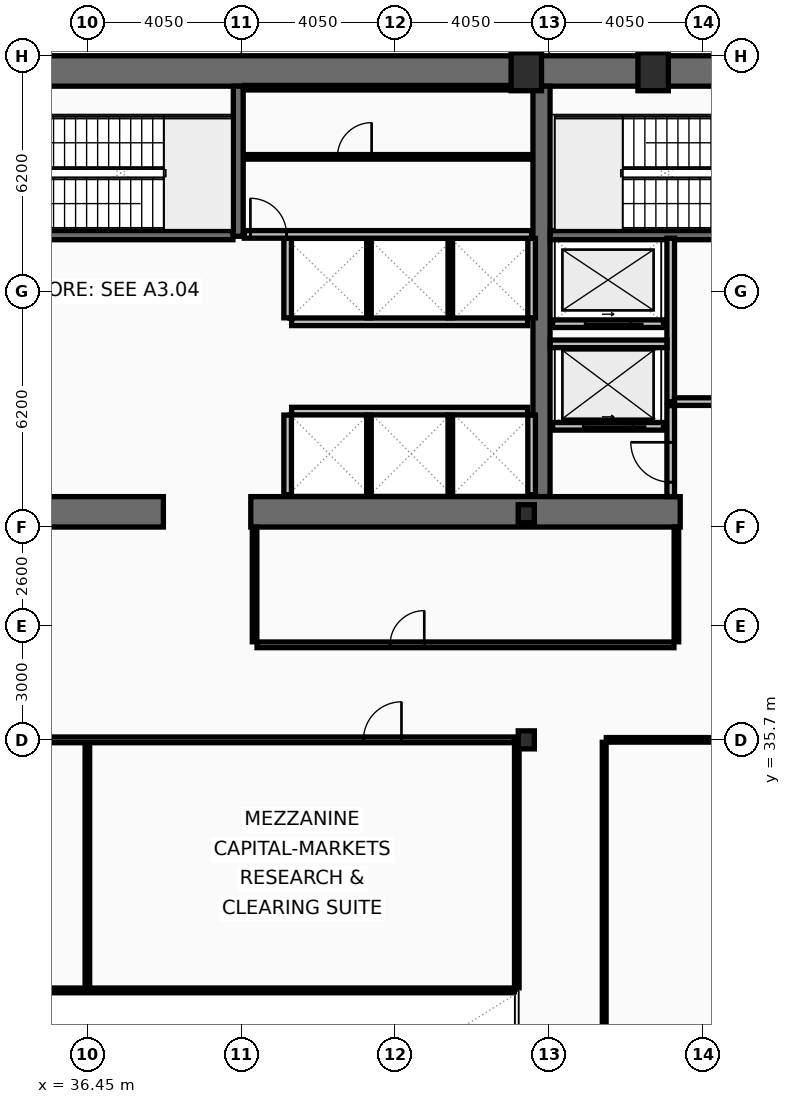
"""IFC4 building model, lengths in metres.
Left out: names, types, materials, properties, quantities, classifications, styles, units other than length and angle.
Written with IfcOpenShell. Run it as: python <this file> out.ifc"""

import sys

from ifc_helpers import new_model, si_unit, direction, frame, frame_2d, origin, origin_2d, place, context, subcontext, project, spatial, rectangle, hollow_rectangle, i_section, extrude, element, fill, save


model = new_model("IFC4")
c1 = context("Model", 3, precision=1e-05, world=origin(), true_north=direction((0.0, 1.0)))
c2 = subcontext(c1, "Body", "Model", "MODEL_VIEW")
j1 = project(units=[si_unit("LENGTHUNIT", "METRE"), si_unit("PLANEANGLEUNIT", "RADIAN")], contexts=[c1])
p1 = place(None, origin())
s1 = spatial("IfcSite", under=j1, at=p1, CompositionType="ELEMENT")
p2 = place(p1, origin())
s2 = spatial("IfcBuilding", under=s1, at=p2, CompositionType="ELEMENT")
p3 = place(p2, frame((0.0, 0.0, 5.4)))
s3 = spatial("IfcBuildingStorey", under=s2, at=p3, CompositionType="ELEMENT", Elevation=5.4)
p4 = place(p3, frame((16.2, 53.3, 0.0), z_axis=(0.0, 0.0, 1.0), x_axis=(1.0, 0.0, 0.0)))
e1 = element("IfcWall", 1, at=p4, inside=s3, PredefinedType="SHEAR", context=c2, shape_type="SweptSolid", body=[
    extrude(rectangle(XDim=40.5, YDim=0.8, at=frame_2d((20.25, 0.0))), origin(), (0.0, 0.0, 1.0), 4.8),
])
p5 = place(p3, frame((48.4, 42.1, 0.0), z_axis=(0.0, 0.0, 1.0), x_axis=(0.0, 1.0, 0.0)))
e2 = element("IfcWall", 2, at=p5, inside=s3, PredefinedType="SHEAR", context=c2, shape_type="SweptSolid", body=[
    extrude(rectangle(XDim=10.8, YDim=0.45, at=frame_2d((5.4, 0.0))), origin(), (0.0, 0.0, 1.0), 4.8),
])
p6 = place(p3, frame((38.45, 41.7, 0.0), z_axis=(0.0, 0.0, 1.0), x_axis=(-1.0, 0.0, 0.0)))
e3 = element("IfcWall", 3, at=p6, inside=s3, PredefinedType="SHEAR", context=c2, shape_type="SweptSolid", body=[
    extrude(rectangle(XDim=3.75, YDim=0.8, at=frame_2d((1.875, 0.0))), origin(), (0.0, 0.0, 1.0), 4.8),
])
p7 = place(p3, frame((52.05, 41.7, 0.0), z_axis=(0.0, 0.0, 1.0), x_axis=(-1.0, 0.0, 0.0)))
e4 = element("IfcWall", 4, at=p7, inside=s3, PredefinedType="SHEAR", context=c2, shape_type="SweptSolid", body=[
    extrude(rectangle(XDim=11.3, YDim=0.8, at=frame_2d((5.65, 0.0))), origin(), (0.0, 0.0, 1.0), 4.8),
])
p8 = place(p3, frame((40.42, 48.95, 0.0), z_axis=(0.0, 0.0, 1.0), x_axis=(0.0, 1.0, 0.0)))
e5 = element("IfcWall", 5, at=p8, inside=s3, PredefinedType="SHEAR", context=c2, shape_type="SweptSolid", body=[
    extrude(rectangle(XDim=3.95, YDim=0.26, at=frame_2d((1.975, 0.0))), origin(), (0.0, 0.0, 1.0), 4.8),
])
p9 = place(p3, frame((48.63, 48.98, 0.0), z_axis=(0.0, 0.0, 1.0), x_axis=(1.0, 0.0, 0.0)))
e6 = element("IfcWall", 6, at=p9, inside=s3, PredefinedType="SHEAR", context=c2, shape_type="SweptSolid", body=[
    extrude(rectangle(XDim=7.27, YDim=0.24, at=frame_2d((3.635, 0.0))), origin(), (0.0, 0.0, 1.0), 4.8),
])
p10 = place(p9, frame((6.0, 0.0, 0.0)))
e7 = element("IfcOpeningElement", 7, at=p10, cuts=e6, PredefinedType="OPENING", context=c2, shape_type="SweptSolid", body=[
    extrude(rectangle(XDim=1.05, YDim=2.15, at=frame_2d((0.525, 1.075))), frame((0.0, 0.13, 0.0), z_axis=(0.0, -1.0, 0.0), x_axis=(1.0, 0.0, 0.0)), (0.0, 0.0, 1.0), 0.26),
])
p11 = place(p3, frame((32.72, 48.98, 0.0), z_axis=(0.0, 0.0, 1.0), x_axis=(1.0, 0.0, 0.0)))
e8 = element("IfcWall", 8, at=p11, inside=s3, PredefinedType="SHEAR", context=c2, shape_type="SweptSolid", body=[
    extrude(rectangle(XDim=7.56, YDim=0.24, at=frame_2d((3.78, 0.0))), origin(), (0.0, 0.0, 1.0), 4.8),
])
p12 = place(p11, frame((0.22, 0.0, 0.0)))
e9 = element("IfcOpeningElement", 9, at=p12, cuts=e8, PredefinedType="OPENING", context=c2, shape_type="SweptSolid", body=[
    extrude(rectangle(XDim=1.05, YDim=2.15, at=frame_2d((0.525, 1.075))), frame((0.0, 0.13, 0.0), z_axis=(0.0, -1.0, 0.0), x_axis=(1.0, 0.0, 0.0)), (0.0, 0.0, 1.0), 0.26),
])
for number, where, z_axis, x_axis in (
    (10, (48.0, 53.28, 0.0), (0.0, 0.0, 1.0), (1.0, 0.0, 0.0)),
    (11, (51.337, 53.28, 0.0), (0.0, 0.0, 1.0), (1.0, 0.0, 0.0)),
):
    element("IfcColumn", number, at=place(p3, frame(where, z_axis=z_axis, x_axis=x_axis)), inside=s3, PredefinedType="COLUMN", context=c2, shape_type="SweptSolid", body=[
        extrude(hollow_rectangle(XDim=0.8, YDim=1.0, WallThickness=0.055, at=origin_2d()), origin(), (0.0, 0.0, 1.0), 5.0),
    ])
for number, where, z_axis, x_axis in (
    (12, (48.0, 35.7, 0.0), (0.0, 0.0, 1.0), (1.0, 0.0, 0.0)),
    (13, (48.0, 41.65, 0.0), (0.0, 0.0, 1.0), (1.0, 0.0, 0.0)),
):
    element("IfcColumn", number, at=place(p3, frame(where, z_axis=z_axis, x_axis=x_axis)), inside=s3, PredefinedType="COLUMN", context=c2, shape_type="SweptSolid", body=[
        extrude(i_section(OverallWidth=0.424, OverallDepth=0.474, WebThickness=0.048, FlangeThickness=0.077, at=origin_2d()), origin(), (0.0, 0.0, 1.0), 5.0),
    ])
p13 = place(p3, frame((51.61, 43.95, 0.0), z_axis=(0.0, 0.0, 1.0), x_axis=(-1.0, 0.0, 0.0)))
e14 = element("IfcWall", 14, at=p13, inside=s3, PredefinedType="PARTITIONING", context=c2, shape_type="SweptSolid", body=[
    extrude(rectangle(XDim=2.92, YDim=0.2, at=frame_2d((1.46, 0.0))), origin(), (0.0, 0.0, 1.0), 4.8),
])
p14 = place(p13, frame((0.81, 0.0, 0.0)))
e15 = element("IfcOpeningElement", 15, at=p14, cuts=e14, PredefinedType="OPENING", context=c2, shape_type="SweptSolid", body=[
    extrude(rectangle(XDim=1.3, YDim=2.18, at=frame_2d((0.65, 1.09))), frame((0.0, 0.11, 0.0), z_axis=(0.0, -1.0, 0.0), x_axis=(1.0, 0.0, 0.0)), (0.0, 0.0, 1.0), 0.22),
])
p15 = place(p3, frame((51.61, 46.65, 0.0), z_axis=(0.0, 0.0, 1.0), x_axis=(-1.0, 0.0, 0.0)))
e16 = element("IfcWall", 16, at=p15, inside=s3, PredefinedType="PARTITIONING", context=c2, shape_type="SweptSolid", body=[
    extrude(rectangle(XDim=2.92, YDim=0.2, at=frame_2d((1.46, 0.0))), origin(), (0.0, 0.0, 1.0), 4.8),
])
p16 = place(p15, frame((0.86, 0.0, 0.0)))
e17 = element("IfcOpeningElement", 17, at=p16, cuts=e16, PredefinedType="OPENING", context=c2, shape_type="SweptSolid", body=[
    extrude(rectangle(XDim=1.2, YDim=2.18, at=frame_2d((0.6, 1.09))), frame((0.0, 0.11, 0.0), z_axis=(0.0, -1.0, 0.0), x_axis=(1.0, 0.0, 0.0)), (0.0, 0.0, 1.0), 0.22),
])
p17 = place(p3, frame((51.8, 44.6, 0.0), z_axis=(0.0, 0.0, 1.0), x_axis=(0.0, 1.0, 0.0)))
e18 = element("IfcWall", 18, at=p17, inside=s3, PredefinedType="PARTITIONING", context=c2, shape_type="SweptSolid", body=[
    extrude(rectangle(XDim=4.3, YDim=0.2, at=frame_2d((2.15, 0.0))), origin(), (0.0, 0.0, 1.0), 4.8),
])
p18 = place(p3, frame((51.9, 44.6, 0.0), z_axis=(0.0, 0.0, 1.0), x_axis=(1.0, 0.0, 0.0)))
e19 = element("IfcWall", 19, at=p18, inside=s3, PredefinedType="PARTITIONING", context=c2, shape_type="SweptSolid", body=[
    extrude(rectangle(XDim=4.0, YDim=0.2, at=frame_2d((2.0, 0.0))), origin(), (0.0, 0.0, 1.0), 4.8),
])
p19 = place(p18, frame((1.15, 0.0, 0.0)))
e20 = element("IfcOpeningElement", 20, at=p19, cuts=e19, PredefinedType="OPENING", context=c2, shape_type="SweptSolid", body=[
    extrude(rectangle(XDim=1.05, YDim=2.15, at=frame_2d((0.525, 1.075))), frame((0.0, 0.11, 0.0), z_axis=(0.0, -1.0, 0.0), x_axis=(1.0, 0.0, 0.0)), (0.0, 0.0, 1.0), 0.22),
])
p20 = place(p3, frame((48.63, 46.12, 0.0), z_axis=(0.0, 0.0, 1.0), x_axis=(1.0, 0.0, 0.0)))
e21 = element("IfcWall", 21, at=p20, inside=s3, PredefinedType="PARTITIONING", context=c2, shape_type="SweptSolid", body=[
    extrude(rectangle(XDim=3.07, YDim=0.2, at=frame_2d((1.535, 0.0))), origin(), (0.0, 0.0, 1.0), 4.8),
])
p21 = place(p3, frame((51.8, 42.1, 0.0), z_axis=(0.0, 0.0, 1.0), x_axis=(0.0, 1.0, 0.0)))
e22 = element("IfcWall", 22, at=p21, inside=s3, PredefinedType="PARTITIONING", context=c2, shape_type="SweptSolid", body=[
    extrude(rectangle(XDim=2.395, YDim=0.2, at=frame_2d((1.198, 0.0))), origin(), (0.0, 0.0, 1.0), 4.8),
])
p22 = place(p21, frame((0.38, 0.0, 0.0)))
e23 = element("IfcOpeningElement", 23, at=p22, cuts=e22, PredefinedType="OPENING", context=c2, shape_type="SweptSolid", body=[
    extrude(rectangle(XDim=1.05, YDim=2.15, at=frame_2d((0.525, 1.075))), frame((0.0, 0.11, 0.0), z_axis=(0.0, -1.0, 0.0), x_axis=(1.0, 0.0, 0.0)), (0.0, 0.0, 1.0), 0.22),
])
p23 = place(p3, frame((41.825, 46.7, 0.0), z_axis=(0.0, 0.0, 1.0), x_axis=(1.0, 0.0, 0.0)))
e24 = element("IfcWall", 24, at=p23, inside=s3, PredefinedType="PARTITIONING", context=c2, shape_type="SweptSolid", body=[
    extrude(rectangle(XDim=6.21, YDim=0.2, at=frame_2d((3.105, 0.0))), origin(), (0.0, 0.0, 1.0), 4.8),
])
for number, where, z_axis, x_axis in (
    (25, (41.72, 46.805, 0.0), (0.0, 0.0, 1.0), (0.0, 1.0, 0.0)),
    (26, (48.14, 46.805, 0.0), (0.0, 0.0, 1.0), (0.0, 1.0, 0.0)),
):
    element("IfcWall", number, at=place(p3, frame(where, z_axis=z_axis, x_axis=x_axis)), inside=s3, PredefinedType="PARTITIONING", context=c2, shape_type="SweptSolid", body=[
        extrude(rectangle(XDim=2.09, YDim=0.2, at=frame_2d((1.045, 0.0))), origin(), (0.0, 0.0, 1.0), 4.8),
    ])
for number, where, z_axis, x_axis in (
    (27, (43.86, 46.805, 0.0), (0.0, 0.0, 1.0), (0.0, 1.0, 0.0)),
    (28, (46.0, 46.805, 0.0), (0.0, 0.0, 1.0), (0.0, 1.0, 0.0)),
):
    element("IfcWall", number, at=place(p3, frame(where, z_axis=z_axis, x_axis=x_axis)), inside=s3, PredefinedType="PARTITIONING", context=c2, shape_type="SweptSolid", body=[
        extrude(rectangle(XDim=2.09, YDim=0.12, at=frame_2d((1.045, 0.0))), origin(), (0.0, 0.0, 1.0), 4.8),
    ])
p24 = place(p3, frame((41.825, 44.35, 0.0), z_axis=(0.0, 0.0, 1.0), x_axis=(1.0, 0.0, 0.0)))
e29 = element("IfcWall", 29, at=p24, inside=s3, PredefinedType="PARTITIONING", context=c2, shape_type="SweptSolid", body=[
    extrude(rectangle(XDim=6.21, YDim=0.2, at=frame_2d((3.105, 0.0))), origin(), (0.0, 0.0, 1.0), 4.8),
])
for number, where, z_axis, x_axis in (
    (30, (41.72, 42.15, 0.0), (0.0, 0.0, 1.0), (0.0, 1.0, 0.0)),
    (31, (48.14, 42.15, 0.0), (0.0, 0.0, 1.0), (0.0, 1.0, 0.0)),
):
    element("IfcWall", number, at=place(p3, frame(where, z_axis=z_axis, x_axis=x_axis)), inside=s3, PredefinedType="PARTITIONING", context=c2, shape_type="SweptSolid", body=[
        extrude(rectangle(XDim=2.095, YDim=0.2, at=frame_2d((1.048, 0.0))), origin(), (0.0, 0.0, 1.0), 4.8),
    ])
for number, where, z_axis, x_axis in (
    (32, (43.86, 42.15, 0.0), (0.0, 0.0, 1.0), (0.0, 1.0, 0.0)),
    (33, (46.0, 42.15, 0.0), (0.0, 0.0, 1.0), (0.0, 1.0, 0.0)),
):
    element("IfcWall", number, at=place(p3, frame(where, z_axis=z_axis, x_axis=x_axis)), inside=s3, PredefinedType="PARTITIONING", context=c2, shape_type="SweptSolid", body=[
        extrude(rectangle(XDim=2.095, YDim=0.12, at=frame_2d((1.048, 0.0))), origin(), (0.0, 0.0, 1.0), 4.8),
    ])
p25 = place(p3, frame((40.58, 52.86, 0.0), z_axis=(0.0, 0.0, 1.0), x_axis=(1.0, 0.0, 0.0)))
e34 = element("IfcWall", 34, at=p25, inside=s3, PredefinedType="PARTITIONING", context=c2, shape_type="SweptSolid", body=[
    extrude(rectangle(XDim=7.56, YDim=0.12, at=frame_2d((3.78, 0.0))), origin(), (0.0, 0.0, 1.0), 4.8),
])
p26 = place(p3, frame((40.58, 49.0, 0.0), z_axis=(0.0, 0.0, 1.0), x_axis=(1.0, 0.0, 0.0)))
e35 = element("IfcWall", 35, at=p26, inside=s3, PredefinedType="PARTITIONING", context=c2, shape_type="SweptSolid", body=[
    extrude(rectangle(XDim=7.56, YDim=0.2, at=frame_2d((3.78, 0.0))), origin(), (0.0, 0.0, 1.0), 4.8),
])
p27 = place(p26, frame((0.16, 0.0, 0.0)))
e36 = element("IfcOpeningElement", 36, at=p27, cuts=e35, PredefinedType="OPENING", context=c2, shape_type="SweptSolid", body=[
    extrude(rectangle(XDim=0.95, YDim=2.1, at=frame_2d((0.475, 1.05))), frame((0.0, 0.11, 0.0), z_axis=(0.0, -1.0, 0.0), x_axis=(1.0, 0.0, 0.0)), (0.0, 0.0, 1.0), 0.22),
])
p28 = place(p3, frame((40.63, 51.04, 0.0), z_axis=(0.0, 0.0, 1.0), x_axis=(1.0, 0.0, 0.0)))
e37 = element("IfcWall", 37, at=p28, inside=s3, PredefinedType="PARTITIONING", context=c2, shape_type="SweptSolid", body=[
    extrude(rectangle(XDim=7.46, YDim=0.12, at=frame_2d((3.73, 0.0))), origin(), (0.0, 0.0, 1.0), 4.8),
])
p29 = place(p28, frame((2.4, 0.0, 0.0)))
e38 = element("IfcOpeningElement", 38, at=p29, cuts=e37, PredefinedType="OPENING", context=c2, shape_type="SweptSolid", body=[
    extrude(rectangle(XDim=0.9, YDim=2.05, at=frame_2d((0.45, 1.025))), frame((0.0, 0.07, 0.0), z_axis=(0.0, -1.0, 0.0), x_axis=(1.0, 0.0, 0.0)), (0.0, 0.0, 1.0), 0.14),
])
p30 = place(p3, frame((25.215, 29.12, 0.0), z_axis=(0.0, 0.0, 1.0), x_axis=(1.0, 0.0, 0.0)))
e39 = element("IfcWall", 39, at=p30, inside=s3, PredefinedType="MOVABLE", context=c2, shape_type="SweptSolid", body=[
    extrude(rectangle(XDim=22.47, YDim=0.1, at=frame_2d((11.235, 0.0))), origin(), (0.0, 0.0, 1.0), 3.89),
])
p31 = place(p3, frame((36.45, 29.175, 0.0), z_axis=(0.0, 0.0, 1.0), x_axis=(0.0, 1.0, 0.0)))
e40 = element("IfcWall", 40, at=p31, inside=s3, PredefinedType="PARTITIONING", context=c2, shape_type="SweptSolid", body=[
    extrude(rectangle(XDim=6.445, YDim=0.12, at=frame_2d((3.223, 0.0))), origin(), (0.0, 0.0, 1.0), 3.89),
])
p32 = place(p3, frame((25.215, 35.7, 0.0), z_axis=(0.0, 0.0, 1.0), x_axis=(1.0, 0.0, 0.0)))
e41 = element("IfcWall", 41, at=p32, inside=s3, PredefinedType="PARTITIONING", context=c2, shape_type="SweptSolid", body=[
    extrude(rectangle(XDim=22.47, YDim=0.15, at=frame_2d((11.235, 0.0))), origin(), (0.0, 0.0, 1.0), 3.89),
])
p33 = place(p32, frame((6.0, 0.0, 0.0)))
e42 = element("IfcOpeningElement", 42, at=p33, cuts=e41, PredefinedType="OPENING", context=c2, shape_type="SweptSolid", body=[
    extrude(rectangle(XDim=1.0, YDim=2.05, at=frame_2d((0.5, 1.025))), frame((0.0, 0.085, 0.0), z_axis=(0.0, -1.0, 0.0), x_axis=(1.0, 0.0, 0.0)), (0.0, 0.0, 1.0), 0.17),
])
p34 = place(p32, frame((18.5, 0.0, 0.0)))
e43 = element("IfcOpeningElement", 43, at=p34, cuts=e41, PredefinedType="OPENING", context=c2, shape_type="SweptSolid", body=[
    extrude(rectangle(XDim=1.0, YDim=2.05, at=frame_2d((0.5, 1.025))), frame((0.0, 0.085, 0.0), z_axis=(0.0, -1.0, 0.0), x_axis=(1.0, 0.0, 0.0)), (0.0, 0.0, 1.0), 0.17),
])
p35 = place(p3, frame((47.75, 29.175, 0.0), z_axis=(0.0, 0.0, 1.0), x_axis=(0.0, 1.0, 0.0)))
e44 = element("IfcWall", 44, at=p35, inside=s3, PredefinedType="PARTITIONING", context=c2, shape_type="SweptSolid", body=[
    extrude(rectangle(XDim=6.445, YDim=0.12, at=frame_2d((3.223, 0.0))), origin(), (0.0, 0.0, 1.0), 3.89),
])
for number, where, z_axis, x_axis in (
    (45, (40.85, 38.28, 0.0), (0.0, 0.0, 1.0), (0.0, 1.0, 0.0)),
    (46, (51.95, 38.28, 0.0), (0.0, 0.0, 1.0), (0.0, 1.0, 0.0)),
):
    element("IfcWall", number, at=place(p3, frame(where, z_axis=z_axis, x_axis=x_axis)), inside=s3, PredefinedType="PARTITIONING", context=c2, shape_type="SweptSolid", body=[
        extrude(rectangle(XDim=3.02, YDim=0.12, at=frame_2d((1.51, 0.0))), origin(), (0.0, 0.0, 1.0), 4.8),
    ])
p36 = place(p3, frame((40.915, 38.2, 0.0), z_axis=(0.0, 0.0, 1.0), x_axis=(1.0, 0.0, 0.0)))
e47 = element("IfcWall", 47, at=p36, inside=s3, PredefinedType="PARTITIONING", context=c2, shape_type="SweptSolid", body=[
    extrude(rectangle(XDim=10.97, YDim=0.15, at=frame_2d((5.485, 0.0))), origin(), (0.0, 0.0, 1.0), 3.89),
])
p37 = place(p36, frame((3.5, 0.0, 0.0)))
e48 = element("IfcOpeningElement", 48, at=p37, cuts=e47, PredefinedType="OPENING", context=c2, shape_type="SweptSolid", body=[
    extrude(rectangle(XDim=0.9, YDim=2.05, at=frame_2d((0.45, 1.025))), frame((0.0, 0.085, 0.0), z_axis=(0.0, -1.0, 0.0), x_axis=(1.0, 0.0, 0.0)), (0.0, 0.0, 1.0), 0.17),
])
p38 = place(p3, frame((50.05, 14.965, 0.0), z_axis=(0.0, 0.0, 1.0), x_axis=(0.0, 1.0, 0.0)))
e49 = element("IfcWall", 49, at=p38, inside=s3, PredefinedType="MOVABLE", context=c2, shape_type="SweptSolid", body=[
    extrude(rectangle(XDim=20.67, YDim=0.1, at=frame_2d((10.335, 0.0))), origin(), (0.0, 0.0, 1.0), 4.19),
])
p39 = place(p38, frame((6.5, 0.0, 0.0)))
e50 = element("IfcOpeningElement", 50, at=p39, cuts=e49, PredefinedType="OPENING", context=c2, shape_type="SweptSolid", body=[
    extrude(rectangle(XDim=1.0, YDim=2.05, at=frame_2d((0.5, 1.025))), frame((0.0, 0.06, 0.0), z_axis=(0.0, -1.0, 0.0), x_axis=(1.0, 0.0, 0.0)), (0.0, 0.0, 1.0), 0.12),
])
p40 = place(p3, frame((50.105, 35.7, 0.0), z_axis=(0.0, 0.0, 1.0), x_axis=(1.0, 0.0, 0.0)))
e51 = element("IfcWall", 51, at=p40, inside=s3, PredefinedType="PARTITIONING", context=c2, shape_type="SweptSolid", body=[
    extrude(rectangle(XDim=6.555, YDim=0.12, at=frame_2d((3.277, 0.0))), origin(), (0.0, 0.0, 1.0), 3.89),
])
p41 = place(p14, origin())
e52 = element("IfcDoor", 52, at=p41, inside=s3, OperationType="SLIDING_TO_LEFT", PredefinedType="DOOR", context=c2, shape_type="SweptSolid", body=[
    extrude(rectangle(XDim=1.3, YDim=2.18, at=frame_2d((0.65, 1.09))), frame((0.0, 0.025, 0.0), z_axis=(0.0, -1.0, 0.0), x_axis=(1.0, 0.0, 0.0)), (0.0, 0.0, 1.0), 0.05),
])
fill(e15, e52)
p42 = place(p16, origin())
e53 = element("IfcDoor", 53, at=p42, inside=s3, OperationType="SLIDING_TO_LEFT", PredefinedType="DOOR", context=c2, shape_type="SweptSolid", body=[
    extrude(rectangle(XDim=1.2, YDim=2.18, at=frame_2d((0.6, 1.09))), frame((0.0, 0.025, 0.0), z_axis=(0.0, -1.0, 0.0), x_axis=(1.0, 0.0, 0.0)), (0.0, 0.0, 1.0), 0.05),
])
fill(e17, e53)
p43 = place(p22, origin())
e54 = element("IfcDoor", 54, at=p43, inside=s3, OperationType="SINGLE_SWING_RIGHT", PredefinedType="DOOR", context=c2, shape_type="SweptSolid", body=[
    extrude(rectangle(XDim=1.05, YDim=2.15, at=frame_2d((0.525, 1.075))), frame((0.0, 0.025, 0.0), z_axis=(0.0, -1.0, 0.0), x_axis=(1.0, 0.0, 0.0)), (0.0, 0.0, 1.0), 0.05),
])
fill(e23, e54)
p44 = place(p27, origin())
e55 = element("IfcDoor", 55, at=p44, inside=s3, OperationType="SINGLE_SWING_LEFT", PredefinedType="DOOR", context=c2, shape_type="SweptSolid", body=[
    extrude(rectangle(XDim=0.95, YDim=2.1, at=frame_2d((0.475, 1.05))), frame((0.0, 0.025, 0.0), z_axis=(0.0, -1.0, 0.0), x_axis=(1.0, 0.0, 0.0)), (0.0, 0.0, 1.0), 0.05),
])
fill(e36, e55)
p45 = place(p29, origin())
e56 = element("IfcDoor", 56, at=p45, inside=s3, OperationType="SINGLE_SWING_RIGHT", PredefinedType="DOOR", context=c2, shape_type="SweptSolid", body=[
    extrude(rectangle(XDim=0.9, YDim=2.05, at=frame_2d((0.45, 1.025))), frame((0.0, 0.025, 0.0), z_axis=(0.0, -1.0, 0.0), x_axis=(1.0, 0.0, 0.0)), (0.0, 0.0, 1.0), 0.05),
])
fill(e38, e56)
p46 = place(p34, origin())
e57 = element("IfcDoor", 57, at=p46, inside=s3, OperationType="SINGLE_SWING_RIGHT", PredefinedType="DOOR", context=c2, shape_type="SweptSolid", body=[
    extrude(rectangle(XDim=1.0, YDim=2.05, at=frame_2d((0.5, 1.025))), frame((0.0, 0.025, 0.0), z_axis=(0.0, -1.0, 0.0), x_axis=(1.0, 0.0, 0.0)), (0.0, 0.0, 1.0), 0.05),
])
fill(e43, e57)
p47 = place(p37, origin())
e58 = element("IfcDoor", 58, at=p47, inside=s3, OperationType="SINGLE_SWING_RIGHT", PredefinedType="DOOR", context=c2, shape_type="SweptSolid", body=[
    extrude(rectangle(XDim=0.9, YDim=2.05, at=frame_2d((0.45, 1.025))), frame((0.0, 0.025, 0.0), z_axis=(0.0, -1.0, 0.0), x_axis=(1.0, 0.0, 0.0)), (0.0, 0.0, 1.0), 0.05),
])
fill(e48, e58)
save(model, sys.argv[1])
